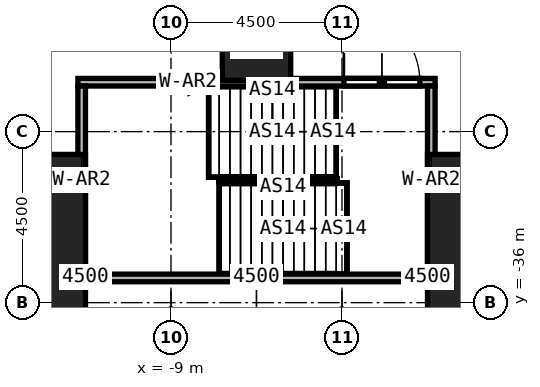
"""IFC4 building model, lengths in metres.
Left out: names, types, materials, properties, quantities, classifications, styles, units other than length and angle.
Written with IfcOpenShell. Run it as: python <this file> out.ifc"""

import sys

from ifc_helpers import new_model, si_unit, direction, frame, frame_2d, origin, origin_2d, place, context, subcontext, project, spatial, rectangle, extrude, element, fill, save


model = new_model("IFC4")
c1 = context("Model", 3, precision=1e-05, world=origin(), true_north=direction((0.0, 1.0)))
c2 = subcontext(c1, "Body", "Model", "MODEL_VIEW")
j1 = project(units=[si_unit("LENGTHUNIT", "METRE"), si_unit("PLANEANGLEUNIT", "RADIAN")], contexts=[c1])
p1 = place(None, origin())
s1 = spatial("IfcSite", under=j1, at=p1, CompositionType="ELEMENT")
p2 = place(p1, origin())
s2 = spatial("IfcBuilding", under=s1, at=p2, CompositionType="ELEMENT")
p3 = place(p2, origin())
s3 = spatial("IfcBuildingStorey", under=s2, at=p3, CompositionType="ELEMENT", Elevation=0.0)
for number, where, z_axis, x_axis in (
    (1, (-13.5, -35.55, 0.0), (0.0, 0.0, 1.0), (1.0, 0.0, 0.0)),
    (2, (0.0, -35.55, 0.0), (0.0, 0.0, 1.0), (1.0, 0.0, 0.0)),
):
    element("IfcColumn", number, at=place(p3, frame(where, z_axis=z_axis, x_axis=x_axis)), inside=s3, PredefinedType="COLUMN", context=c2, shape_type="SweptSolid", body=[
        extrude(rectangle(XDim=4.5, YDim=6.9, at=origin_2d()), origin(), (0.0, 0.0, 1.0), 12.0),
    ])
p4 = place(p3, frame((-6.75, -29.25, 0.0), z_axis=(0.0, 0.0, 1.0), x_axis=(1.0, 0.0, 0.0)))
e3 = element("IfcColumn", 3, at=p4, inside=s3, PredefinedType="COLUMN", context=c2, shape_type="SweptSolid", body=[
    extrude(rectangle(XDim=1.8, YDim=1.8, at=origin_2d()), origin(), (0.0, 0.0, 1.0), 12.0),
])
p5 = place(p3, frame((-11.45, -30.2, 0.0), z_axis=(0.0, 0.0, 1.0), x_axis=(1.0, 0.0, 0.0)))
e4 = element("IfcWall", 4, at=p5, inside=s3, PredefinedType="SOLIDWALL", context=c2, shape_type="SweptSolid", body=[
    extrude(rectangle(XDim=9.4, YDim=0.2, at=frame_2d((4.7, 0.0))), origin(), (0.0, 0.0, 1.0), 12.0),
])
p6 = place(p5, frame((7.0, 0.0, 0.0)))
e5 = element("IfcOpeningElement", 5, at=p6, cuts=e4, PredefinedType="OPENING", context=c2, shape_type="SweptSolid", body=[
    extrude(rectangle(XDim=2.0, YDim=2.4, at=frame_2d((1.0, 1.2))), frame((0.0, 0.1, 0.0), z_axis=(0.0, -1.0, 0.0), x_axis=(1.0, 0.0, 0.0)), (0.0, 0.0, 1.0), 0.2),
])
p7 = place(p3, frame((-11.45, -35.35, 0.0), z_axis=(0.0, 0.0, 1.0), x_axis=(1.0, 0.0, 0.0)))
e6 = element("IfcWall", 6, at=p7, inside=s3, PredefinedType="SOLIDWALL", context=c2, shape_type="SweptSolid", body=[
    extrude(rectangle(XDim=9.4, YDim=0.2, at=frame_2d((4.7, 0.0))), origin(), (0.0, 0.0, 1.0), 12.0),
])
for number, where, z_axis, x_axis in (
    (7, (-11.35, -35.25, 0.0), (0.0, 0.0, 1.0), (0.0, 1.0, 0.0)),
    (8, (-2.15, -35.25, 0.0), (0.0, 0.0, 1.0), (0.0, 1.0, 0.0)),
):
    element("IfcWall", number, at=place(p3, frame(where, z_axis=z_axis, x_axis=x_axis)), inside=s3, PredefinedType="SOLIDWALL", context=c2, shape_type="SweptSolid", body=[
        extrude(rectangle(XDim=4.95, YDim=0.2, at=frame_2d((2.475, 0.0))), origin(), (0.0, 0.0, 1.0), 12.0),
    ])
p8 = place(p6, origin())
e9 = element("IfcDoor", 9, at=p8, inside=s3, OperationType="DOUBLE_DOOR_SINGLE_SWING", PredefinedType="DOOR", context=c2, shape_type="SweptSolid", body=[
    extrude(rectangle(XDim=2.0, YDim=2.4, at=frame_2d((1.0, 1.2))), frame((0.0, 0.025, 0.0), z_axis=(0.0, -1.0, 0.0), x_axis=(1.0, 0.0, 0.0)), (0.0, 0.0, 1.0), 0.05),
])
fill(e5, e9)
save(model, sys.argv[1])
